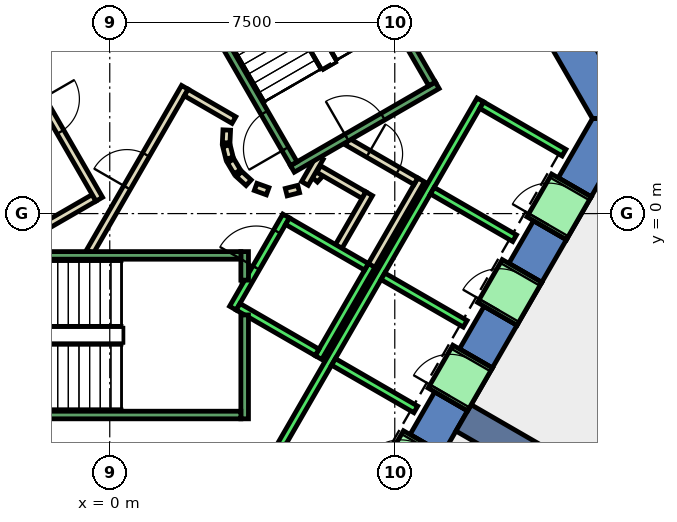
"""IFC4 building model, lengths in metres.
Left out: names, types, materials, properties, quantities, classifications, styles, units other than length and angle.
Written with IfcOpenShell. Run it as: python <this file> out.ifc"""

import sys

from ifc_helpers import new_model, si_unit, direction, frame, frame_2d, origin, place, context, subcontext, project, spatial, polyline, rectangle, outline, extrude, element, fill, save


model = new_model("IFC4")
c1 = context("Model", 3, precision=1e-05, world=origin(), true_north=direction((0.0, 1.0)))
c2 = subcontext(c1, "Body", "Model", "MODEL_VIEW")
j1 = project(units=[si_unit("LENGTHUNIT", "METRE"), si_unit("PLANEANGLEUNIT", "RADIAN")], contexts=[c1])
p1 = place(None, origin())
s1 = spatial("IfcSite", under=j1, at=p1, CompositionType="ELEMENT")
p2 = place(p1, origin())
s2 = spatial("IfcBuilding", under=s1, at=p2, CompositionType="ELEMENT")
p3 = place(p2, frame((0.0, 0.0, 20.0)))
s3 = spatial("IfcBuildingStorey", under=s2, at=p3, CompositionType="ELEMENT", Elevation=20.0)
p4 = place(p3, frame((0.0, 0.0, -0.45)))
e1 = element("IfcWall", 1, at=p4, inside=s3, PredefinedType="SHEAR", context=c2, shape_type="SweptSolid", body=[
    extrude(outline(polyline([(8.517, 11.748), (7.651, 11.248), (12.702, 2.5), (13.856, 2.5), (8.517, 11.748)])), origin(), (0.0, 0.0, 1.0), 5.0),
])
p5 = place(p3, frame((0.0, 0.0, -0.45)))
e2 = element("IfcWall", 2, at=p5, inside=s3, PredefinedType="SHEAR", context=c2, shape_type="SweptSolid", body=[
    extrude(outline(polyline([(9.417, -5.189), (8.551, -4.689), (7.902, -5.814), (8.767, -6.314), (9.417, -5.189)])), origin(), (0.0, 0.0, 1.0), 5.0),
])
p6 = place(p3, frame((0.0, 0.0, -0.45)))
e3 = element("IfcWall", 3, at=p6, inside=s3, PredefinedType="SHEAR", context=c2, shape_type="SweptSolid", body=[
    extrude(outline(polyline([(10.717, -2.937), (9.851, -2.437), (9.201, -3.563), (10.067, -4.063), (10.717, -2.937)])), origin(), (0.0, 0.0, 1.0), 5.0),
])
p7 = place(p3, frame((0.0, 0.0, -0.45)))
e4 = element("IfcWall", 4, at=p7, inside=s3, PredefinedType="SHEAR", context=c2, shape_type="SweptSolid", body=[
    extrude(outline(polyline([(12.017, -0.686), (11.151, -0.186), (10.501, -1.311), (11.367, -1.811), (12.017, -0.686)])), origin(), (0.0, 0.0, 1.0), 5.0),
])
p8 = place(p3, frame((0.0, 0.0, -0.45)))
e5 = element("IfcWall", 5, at=p8, inside=s3, PredefinedType="SHEAR", context=c2, shape_type="SweptSolid", body=[
    extrude(outline(polyline([(11.801, 0.94), (12.667, 0.44), (13.856, 2.5), (12.702, 2.5), (11.801, 0.94)])), origin(), (0.0, 0.0, 1.0), 5.0),
])
p9 = place(p3, frame((0.0, 0.0, 3.6)))
e6 = element("IfcWall", 6, at=p9, inside=s3, PredefinedType="SHEAR", context=c2, shape_type="SweptSolid", body=[
    extrude(outline(polyline([(8.767, -6.314), (7.902, -5.814), (7.252, -6.94), (8.117, -7.44), (8.767, -6.314)])), origin(), (0.0, 0.0, 1.0), 0.95),
])
p10 = place(p3, frame((0.0, 0.0, 3.6)))
e7 = element("IfcWall", 7, at=p10, inside=s3, PredefinedType="SHEAR", context=c2, shape_type="SweptSolid", body=[
    extrude(outline(polyline([(10.067, -4.063), (9.201, -3.563), (8.551, -4.689), (9.417, -5.189), (10.067, -4.063)])), origin(), (0.0, 0.0, 1.0), 0.95),
])
p11 = place(p3, frame((0.0, 0.0, 3.6)))
e8 = element("IfcWall", 8, at=p11, inside=s3, PredefinedType="SHEAR", context=c2, shape_type="SweptSolid", body=[
    extrude(outline(polyline([(11.367, -1.811), (10.501, -1.311), (9.851, -2.437), (10.717, -2.937), (11.367, -1.811)])), origin(), (0.0, 0.0, 1.0), 0.95),
])
p12 = place(p3, frame((0.0, 0.0, 3.6)))
e9 = element("IfcWall", 9, at=p12, inside=s3, PredefinedType="SHEAR", context=c2, shape_type="SweptSolid", body=[
    extrude(outline(polyline([(12.667, 0.44), (11.801, 0.94), (11.151, -0.186), (12.017, -0.686), (12.667, 0.44)])), origin(), (0.0, 0.0, 1.0), 0.95),
])
p13 = place(p3, frame((9.31, -5.375, -0.45), z_axis=(0.0, 0.0, 1.0), x_axis=(0.866017533419, -0.500013631625, 0.0)))
e10 = element("IfcWall", 10, at=p13, inside=s3, PredefinedType="SHEAR", context=c2, shape_type="SweptSolid", body=[
    extrude(rectangle(XDim=9.0, YDim=0.8, at=frame_2d((4.5, 0.0))), origin(), (0.0, 0.0, 1.0), 5.0),
])
p14 = place(p3, frame((5.39, 0.898, 0.0), z_axis=(0.0, 0.0, 1.0), x_axis=(0.673828488714, 0.738887791073, 0.0)))
e11 = element("IfcWall", 11, at=p14, inside=s3, PredefinedType="PARTITIONING", context=c2, shape_type="SweptSolid", body=[
    extrude(rectangle(XDim=0.263, YDim=0.2, at=frame_2d((0.131, 0.0))), origin(), (0.0, 0.0, 1.0), 4.55),
])
p15 = place(p3, frame((5.499, 1.172, 0.0), z_axis=(0.0, 0.0, 1.0), x_axis=(0.866333505267, -0.499465972466, 0.0)))
e12 = element("IfcWall", 12, at=p15, inside=s3, PredefinedType="PARTITIONING", context=c2, shape_type="SweptSolid", body=[
    extrude(rectangle(XDim=1.374, YDim=0.2, at=frame_2d((0.687, 0.0))), origin(), (0.0, 0.0, 1.0), 4.55),
])
p16 = place(p3, frame((6.826, 0.522, 0.0), z_axis=(0.0, 0.0, 1.0), x_axis=(-0.500016722714, -0.866015748706, 0.0)))
e13 = element("IfcWall", 13, at=p16, inside=s3, PredefinedType="PARTITIONING", context=c2, shape_type="SweptSolid", body=[
    extrude(rectangle(XDim=1.7, YDim=0.2, at=frame_2d((0.85, 0.0))), origin(), (0.0, 0.0, 1.0), 4.55),
])
p17 = place(p3, frame((8.192, 0.888, 0.0), z_axis=(0.0, 0.0, 1.0), x_axis=(-0.499940625693, -0.866059680843, 0.0)))
e14 = element("IfcWall", 14, at=p17, inside=s3, PredefinedType="PARTITIONING", context=c2, shape_type="SweptSolid", body=[
    extrude(rectangle(XDim=2.68, YDim=0.2, at=frame_2d((1.34, 0.0))), origin(), (0.0, 0.0, 1.0), 4.55),
])
p18 = place(p3, frame((5.135, 0.793, 0.0), z_axis=(0.0, 0.0, 1.0), x_axis=(0.499526442893, 0.866298639529, 0.0)))
e15 = element("IfcWall", 15, at=p18, inside=s3, PredefinedType="PARTITIONING", context=c2, shape_type="SweptSolid", body=[
    extrude(rectangle(XDim=0.791, YDim=0.2, at=frame_2d((0.396, 0.0))), origin(), (0.0, 0.0, 1.0), 4.55),
])
p19 = place(p3, frame((6.25, 1.894, 0.0), z_axis=(0.0, 0.0, 1.0), x_axis=(0.866043184279, -0.499969202016, 0.0)))
e16 = element("IfcWall", 16, at=p19, inside=s3, PredefinedType="PARTITIONING", context=c2, shape_type="SweptSolid", body=[
    extrude(rectangle(XDim=2.084, YDim=0.2, at=frame_2d((1.042, 0.0))), origin(), (0.0, 0.0, 1.0), 4.55),
])
p20 = place(p19, frame((0.642, 0.0, 0.0)))
e17 = element("IfcOpeningElement", 17, at=p20, cuts=e16, PredefinedType="OPENING", context=c2, shape_type="SweptSolid", body=[
    extrude(rectangle(XDim=0.9, YDim=2.1, at=frame_2d((0.45, 1.05))), frame((0.0, 0.11, 0.0), z_axis=(0.0, -1.0, 0.0), x_axis=(1.0, 0.0, 0.0)), (0.0, 0.0, 1.0), 0.22),
])
p21 = place(p3, frame((3.079, 2.199, 0.0), z_axis=(0.0, 0.0, 1.0), x_axis=(-0.047771483479, -0.998858290933, 0.0)))
e18 = element("IfcWall", 18, at=p21, inside=s3, PredefinedType="PARTITIONING", context=c2, shape_type="SweptSolid", body=[
    extrude(rectangle(XDim=0.337, YDim=0.2, at=frame_2d((0.169, 0.0))), origin(), (0.0, 0.0, 1.0), 4.55),
])
p22 = place(p3, frame((3.07, 1.786, 0.0), z_axis=(0.0, 0.0, 1.0), x_axis=(0.242705583207, -0.970099994784, 0.0)))
e19 = element("IfcWall", 19, at=p22, inside=s3, PredefinedType="PARTITIONING", context=c2, shape_type="SweptSolid", body=[
    extrude(rectangle(XDim=0.338, YDim=0.2, at=frame_2d((0.169, 0.0))), origin(), (0.0, 0.0, 1.0), 4.55),
])
for number, where, z_axis, x_axis in (
    (20, (3.182, 1.388, 0.0), (0.0, 0.0, 1.0), (0.512, -0.859, 0.0)),
    (21, (3.404, 1.039, 0.0), (0.0, 0.0, 1.0), (0.74, -0.672, 0.0)),
):
    element("IfcWall", number, at=place(p3, frame(where, z_axis=z_axis, x_axis=x_axis)), inside=s3, PredefinedType="PARTITIONING", context=c2, shape_type="SweptSolid", body=[
        extrude(rectangle(XDim=0.338, YDim=0.2, at=frame_2d((0.169, 0.0))), origin(), (0.0, 0.0, 1.0), 4.55),
    ])
p23 = place(p3, frame((3.838, 0.702, 0.0), z_axis=(0.0, 0.0, 1.0), x_axis=(0.941035081519, -0.338308993895, 0.0)))
e22 = element("IfcWall", 22, at=p23, inside=s3, PredefinedType="PARTITIONING", context=c2, shape_type="SweptSolid", body=[
    extrude(rectangle(XDim=0.337, YDim=0.2, at=frame_2d((0.168, 0.0))), origin(), (0.0, 0.0, 1.0), 4.55),
])
p24 = place(p3, frame((4.644, 0.564, 0.0), z_axis=(0.0, 0.0, 1.0), x_axis=(0.969929076366, 0.243387729394, 0.0)))
e23 = element("IfcWall", 23, at=p24, inside=s3, PredefinedType="PARTITIONING", context=c2, shape_type="SweptSolid", body=[
    extrude(rectangle(XDim=0.337, YDim=0.2, at=frame_2d((0.168, 0.0))), origin(), (0.0, 0.0, 1.0), 4.55),
])
p25 = place(p3, frame((-0.52, -1.0, 0.0), z_axis=(0.0, 0.0, 1.0), x_axis=(0.50011622646, 0.865958290007, 0.0)))
e24 = element("IfcWall", 24, at=p25, inside=s3, PredefinedType="PARTITIONING", context=c2, shape_type="SweptSolid", body=[
    extrude(rectangle(XDim=4.991, YDim=0.2, at=frame_2d((2.496, 0.0))), origin(), (0.0, 0.0, 1.0), 4.55),
])
p26 = place(p25, frame((1.945, 0.0, 0.0)))
e25 = element("IfcOpeningElement", 25, at=p26, cuts=e24, PredefinedType="OPENING", context=c2, shape_type="SweptSolid", body=[
    extrude(rectangle(XDim=1.0, YDim=2.1, at=frame_2d((0.5, 1.05))), frame((0.0, 0.11, 0.0), z_axis=(0.0, -1.0, 0.0), x_axis=(1.0, 0.0, 0.0)), (0.0, 0.0, 1.0), 0.22),
])
p27 = place(p3, frame((2.012, 3.186, 0.0), z_axis=(0.0, 0.0, 1.0), x_axis=(0.865891012941, -0.500232699559, 0.0)))
e26 = element("IfcWall", 26, at=p27, inside=s3, PredefinedType="PARTITIONING", context=c2, shape_type="SweptSolid", body=[
    extrude(rectangle(XDim=1.449, YDim=0.2, at=frame_2d((0.725, 0.0))), origin(), (0.0, 0.0, 1.0), 4.55),
])
p28 = place(p3, frame((-0.412, 0.414, 0.0), z_axis=(0.0, 0.0, 1.0), x_axis=(-0.866017369001, -0.500013916395, 0.0)))
e27 = element("IfcWall", 27, at=p28, inside=s3, PredefinedType="PARTITIONING", context=c2, shape_type="SweptSolid", body=[
    extrude(rectangle(XDim=1.45, YDim=0.2, at=frame_2d((0.725, 0.0))), origin(), (0.0, 0.0, 1.0), 4.55),
])
p29 = place(p3, frame((-2.771, 4.7, 0.0), z_axis=(0.0, 0.0, 1.0), x_axis=(0.499969479948, -0.866043023828, 0.0)))
e28 = element("IfcWall", 28, at=p29, inside=s3, PredefinedType="PARTITIONING", context=c2, shape_type="SweptSolid", body=[
    extrude(rectangle(XDim=4.99, YDim=0.2, at=frame_2d((2.495, 0.0))), origin(), (0.0, 0.0, 1.0), 4.55),
])
p30 = place(p29, frame((1.945, 0.0, 0.0)))
e29 = element("IfcOpeningElement", 29, at=p30, cuts=e28, PredefinedType="OPENING", context=c2, shape_type="SweptSolid", body=[
    extrude(rectangle(XDim=1.0, YDim=2.1, at=frame_2d((0.5, 1.05))), frame((0.0, 0.11, 0.0), z_axis=(0.0, -1.0, 0.0), x_axis=(1.0, 0.0, 0.0)), (0.0, 0.0, 1.0), 0.22),
])
p31 = place(p3, frame((11.007, 21.435, 0.0), z_axis=(0.0, 0.0, 1.0), x_axis=(0.499977403953, -0.866038449225, 0.0)))
e30 = element("IfcWall", 30, at=p31, inside=s3, PredefinedType="PARTITIONING", context=c2, shape_type="SweptSolid", body=[
    extrude(rectangle(XDim=21.939, YDim=0.15, at=frame_2d((10.969, 0.0))), origin(), (0.0, 0.0, 1.0), 4.55),
])
p32 = place(p3, frame((3.24, -2.488, 0.0), z_axis=(0.0, 0.0, 1.0), x_axis=(0.49994636267, 0.866056369097, 0.0)))
e31 = element("IfcWall", 31, at=p32, inside=s3, PredefinedType="STANDARD", context=c2, shape_type="SweptSolid", body=[
    extrude(rectangle(XDim=2.8, YDim=0.2, at=frame_2d((1.4, 0.0))), origin(), (0.0, 0.0, 1.0), 4.55),
])
p33 = place(p32, frame((1.225, 0.0, 0.0)))
e32 = element("IfcOpeningElement", 32, at=p33, cuts=e31, PredefinedType="OPENING", context=c2, shape_type="SweptSolid", body=[
    extrude(rectangle(XDim=1.1, YDim=2.1, at=frame_2d((0.55, 1.05))), frame((0.0, 0.11, 0.0), z_axis=(0.0, -1.0, 0.0), x_axis=(1.0, 0.0, 0.0)), (0.0, 0.0, 1.0), 0.22),
])
p34 = place(p3, frame((5.492, -3.788, 0.0), z_axis=(0.0, 0.0, 1.0), x_axis=(0.500011755427, 0.866018616679, 0.0)))
e33 = element("IfcWall", 33, at=p34, inside=s3, PredefinedType="STANDARD", context=c2, shape_type="SweptSolid", body=[
    extrude(rectangle(XDim=2.8, YDim=0.2, at=frame_2d((1.4, 0.0))), origin(), (0.0, 0.0, 1.0), 4.55),
])
p35 = place(p3, frame((3.377, -2.452, 0.0), z_axis=(0.0, 0.0, 1.0), x_axis=(0.865955154139, -0.50012165622, 0.0)))
e34 = element("IfcWall", 34, at=p35, inside=s3, PredefinedType="STANDARD", context=c2, shape_type="SweptSolid", body=[
    extrude(rectangle(XDim=2.4, YDim=0.2, at=frame_2d((1.2, 0.0))), origin(), (0.0, 0.0, 1.0), 4.55),
])
p36 = place(p3, frame((4.677, -0.2, 0.0), z_axis=(0.0, 0.0, 1.0), x_axis=(0.865973769406, -0.500089422704, 0.0)))
e35 = element("IfcWall", 35, at=p36, inside=s3, PredefinedType="STANDARD", context=c2, shape_type="SweptSolid", body=[
    extrude(rectangle(XDim=2.399, YDim=0.2, at=frame_2d((1.2, 0.0))), origin(), (0.0, 0.0, 1.0), 4.55),
])
p37 = place(p3, frame((4.451, -6.19, 0.0), z_axis=(0.0, 0.0, 1.0), x_axis=(0.50000090737, 0.866024879913, 0.0)))
e36 = element("IfcWall", 36, at=p37, inside=s3, PredefinedType="STANDARD", context=c2, shape_type="SweptSolid", body=[
    extrude(rectangle(XDim=10.6, YDim=0.2, at=frame_2d((5.3, 0.0))), origin(), (0.0, 0.0, 1.0), 4.55),
])
for number, where, z_axis, x_axis in (
    (37, (5.888, -3.902, 0.0), (0.0, 0.0, 1.0), (0.866, -0.5, 0.0)),
    (38, (7.188, -1.65, 0.0), (0.0, 0.0, 1.0), (0.866, -0.5, 0.0)),
    (39, (8.488, 0.602, 0.0), (0.0, 0.0, 1.0), (0.866, -0.5, 0.0)),
):
    element("IfcWall", number, at=place(p3, frame(where, z_axis=z_axis, x_axis=x_axis)), inside=s3, PredefinedType="STANDARD", context=c2, shape_type="SweptSolid", body=[
        extrude(rectangle(XDim=2.5, YDim=0.2, at=frame_2d((1.25, 0.0))), origin(), (0.0, 0.0, 1.0), 4.55),
    ])
p38 = place(p3, frame((9.788, 2.853, 0.0), z_axis=(0.0, 0.0, 1.0), x_axis=(0.865998541277, -0.500046524342, 0.0)))
e40 = element("IfcWall", 40, at=p38, inside=s3, PredefinedType="STANDARD", context=c2, shape_type="SweptSolid", body=[
    extrude(rectangle(XDim=2.5, YDim=0.2, at=frame_2d((1.25, 0.0))), origin(), (0.0, 0.0, 1.0), 4.55),
])
p39 = place(p3, frame((7.598, -7.14, 0.0), z_axis=(0.0, 0.0, 1.0), x_axis=(0.500362116554, 0.865816234728, 0.0)))
e41 = element("IfcWall", 41, at=p39, inside=s3, PredefinedType="STANDARD", context=c2, shape_type="SweptSolid", body=[
    extrude(rectangle(XDim=1.299, YDim=1.2, at=frame_2d((0.65, 0.0))), origin(), (0.0, 0.0, 1.0), 2.4),
])
p40 = place(p39, frame((0.1, 0.0, 0.0)))
e42 = element("IfcOpeningElement", 42, at=p40, cuts=e41, PredefinedType="OPENING", context=c2, shape_type="SweptSolid", body=[
    extrude(rectangle(XDim=1.1, YDim=2.3, at=frame_2d((0.55, 1.15))), frame((0.0, 0.61, 0.0), z_axis=(0.0, -1.0, 0.0), x_axis=(1.0, 0.0, 0.0)), (0.0, 0.0, 1.0), 1.22),
])
p41 = place(p3, frame((8.898, -4.889, 0.0), z_axis=(0.0, 0.0, 1.0), x_axis=(0.500036693733, 0.866004217611, 0.0)))
e43 = element("IfcWall", 43, at=p41, inside=s3, PredefinedType="STANDARD", context=c2, shape_type="SweptSolid", body=[
    extrude(rectangle(XDim=1.3, YDim=1.2, at=frame_2d((0.65, 0.0))), origin(), (0.0, 0.0, 1.0), 2.4),
])
p42 = place(p41, frame((0.1, 0.0, 0.0)))
e44 = element("IfcOpeningElement", 44, at=p42, cuts=e43, PredefinedType="OPENING", context=c2, shape_type="SweptSolid", body=[
    extrude(rectangle(XDim=1.1, YDim=2.3, at=frame_2d((0.55, 1.15))), frame((0.0, 0.61, 0.0), z_axis=(0.0, -1.0, 0.0), x_axis=(1.0, 0.0, 0.0)), (0.0, 0.0, 1.0), 1.22),
])
p43 = place(p3, frame((10.198, -2.637, 0.0), z_axis=(0.0, 0.0, 1.0), x_axis=(0.49989585183, 0.866085525409, 0.0)))
e45 = element("IfcWall", 45, at=p43, inside=s3, PredefinedType="STANDARD", context=c2, shape_type="SweptSolid", body=[
    extrude(rectangle(XDim=1.3, YDim=1.2, at=frame_2d((0.65, 0.0))), origin(), (0.0, 0.0, 1.0), 2.4),
])
p44 = place(p43, frame((0.1, 0.0, 0.0)))
e46 = element("IfcOpeningElement", 46, at=p44, cuts=e45, PredefinedType="OPENING", context=c2, shape_type="SweptSolid", body=[
    extrude(rectangle(XDim=1.1, YDim=2.3, at=frame_2d((0.55, 1.15))), frame((0.0, 0.61, 0.0), z_axis=(0.0, -1.0, 0.0), x_axis=(1.0, 0.0, 0.0)), (0.0, 0.0, 1.0), 1.22),
])
p45 = place(p3, frame((11.498, -0.385, 0.0), z_axis=(0.0, 0.0, 1.0), x_axis=(0.500221244143, 0.865897630733, 0.0)))
e47 = element("IfcWall", 47, at=p45, inside=s3, PredefinedType="STANDARD", context=c2, shape_type="SweptSolid", body=[
    extrude(rectangle(XDim=1.299, YDim=1.2, at=frame_2d((0.65, 0.0))), origin(), (0.0, 0.0, 1.0), 2.4),
])
p46 = place(p45, frame((0.1, 0.0, 0.0)))
e48 = element("IfcOpeningElement", 48, at=p46, cuts=e47, PredefinedType="OPENING", context=c2, shape_type="SweptSolid", body=[
    extrude(rectangle(XDim=1.1, YDim=2.3, at=frame_2d((0.55, 1.15))), frame((0.0, 0.61, 0.0), z_axis=(0.0, -1.0, 0.0), x_axis=(1.0, 0.0, 0.0)), (0.0, 0.0, 1.0), 1.22),
])
p47 = place(p3, frame((3.55, -2.667, 0.0), z_axis=(0.0, 0.0, 1.0), x_axis=(0.0, -1.0, 0.0)))
e49 = element("IfcWall", 49, at=p47, inside=s3, PredefinedType="STANDARD", context=c2, shape_type="SweptSolid", body=[
    extrude(rectangle(XDim=2.733, YDim=0.2, at=frame_2d((1.366, 0.0))), origin(), (0.0, 0.0, 1.0), 4.55),
])
p48 = place(p3, frame((3.55, -1.0, 0.0), z_axis=(0.0, 0.0, 1.0), x_axis=(0.0, -1.0, 0.0)))
e50 = element("IfcWall", 50, at=p48, inside=s3, PredefinedType="STANDARD", context=c2, shape_type="SweptSolid", body=[
    extrude(rectangle(XDim=0.751, YDim=0.2, at=frame_2d((0.375, 0.0))), origin(), (0.0, 0.0, 1.0), 4.55),
])
p49 = place(p3, frame((-3.45, -1.1, 0.0), z_axis=(0.0, 0.0, 1.0), x_axis=(1.0, 0.0, 0.0)))
e51 = element("IfcWall", 51, at=p49, inside=s3, PredefinedType="STANDARD", context=c2, shape_type="SweptSolid", body=[
    extrude(rectangle(XDim=6.9, YDim=0.2, at=frame_2d((3.45, 0.0))), origin(), (0.0, 0.0, 1.0), 4.55),
])
p50 = place(p49, frame((0.45, 0.0, 0.0)))
e52 = element("IfcOpeningElement", 52, at=p50, cuts=e51, PredefinedType="OPENING", context=c2, shape_type="SweptSolid", body=[
    extrude(rectangle(XDim=1.1, YDim=2.2, at=frame_2d((0.55, 1.1))), frame((0.0, 0.11, 0.0), z_axis=(0.0, -1.0, 0.0), x_axis=(1.0, 0.0, 0.0)), (0.0, 0.0, 1.0), 0.22),
])
p51 = place(p3, frame((-3.45, -5.3, 0.0), z_axis=(0.0, 0.0, 1.0), x_axis=(1.0, 0.0, 0.0)))
e53 = element("IfcWall", 53, at=p51, inside=s3, PredefinedType="STANDARD", context=c2, shape_type="SweptSolid", body=[
    extrude(rectangle(XDim=6.9, YDim=0.2, at=frame_2d((3.45, 0.0))), origin(), (0.0, 0.0, 1.0), 4.55),
])
p52 = place(p3, frame((4.806, 1.176, 0.0), z_axis=(0.0, 0.0, 1.0), x_axis=(0.866059941101, 0.499940174841, 0.0)))
e54 = element("IfcWall", 54, at=p52, inside=s3, PredefinedType="STANDARD", context=c2, shape_type="SweptSolid", body=[
    extrude(rectangle(XDim=4.4, YDim=0.2, at=frame_2d((2.2, 0.0))), origin(), (0.0, 0.0, 1.0), 4.55),
])
p53 = place(p52, frame((1.65, 0.0, 0.0)))
e55 = element("IfcOpeningElement", 55, at=p53, cuts=e54, PredefinedType="OPENING", context=c2, shape_type="SweptSolid", body=[
    extrude(rectangle(XDim=1.1, YDim=2.2, at=frame_2d((0.55, 1.1))), frame((0.0, 0.11, 0.0), z_axis=(0.0, -1.0, 0.0), x_axis=(1.0, 0.0, 0.0)), (0.0, 0.0, 1.0), 0.22),
])
p54 = place(p3, frame((4.843, 1.312, 0.0), z_axis=(0.0, 0.0, 1.0), x_axis=(-0.499963383562, 0.866046543262, 0.0)))
e56 = element("IfcWall", 56, at=p54, inside=s3, PredefinedType="STANDARD", context=c2, shape_type="SweptSolid", body=[
    extrude(rectangle(XDim=6.9, YDim=0.2, at=frame_2d((3.45, 0.0))), origin(), (0.0, 0.0, 1.0), 4.55),
])
p55 = place(p54, frame((0.45, 0.0, 0.0)))
e57 = element("IfcOpeningElement", 57, at=p55, cuts=e56, PredefinedType="OPENING", context=c2, shape_type="SweptSolid", body=[
    extrude(rectangle(XDim=1.1, YDim=2.2, at=frame_2d((0.55, 1.1))), frame((0.0, 0.11, 0.0), z_axis=(0.0, -1.0, 0.0), x_axis=(1.0, 0.0, 0.0)), (0.0, 0.0, 1.0), 0.22),
])
p56 = place(p3, frame((8.48, 3.412, 0.0), z_axis=(0.0, 0.0, 1.0), x_axis=(-0.499978703459, 0.866037698999, 0.0)))
e58 = element("IfcWall", 58, at=p56, inside=s3, PredefinedType="STANDARD", context=c2, shape_type="SweptSolid", body=[
    extrude(rectangle(XDim=6.9, YDim=0.2, at=frame_2d((3.45, 0.0))), origin(), (0.0, 0.0, 1.0), 4.55),
])
p57 = place(p3, frame((-1.393, 7.288, 0.0), z_axis=(0.0, 0.0, 1.0), x_axis=(-0.499963383562, -0.866046543262, 0.0)))
e59 = element("IfcWall", 59, at=p57, inside=s3, PredefinedType="STANDARD", context=c2, shape_type="SweptSolid", body=[
    extrude(rectangle(XDim=6.9, YDim=0.2, at=frame_2d((3.45, 0.0))), origin(), (0.0, 0.0, 1.0), 4.55),
])
p58 = place(p57, frame((0.45, 0.0, 0.0)))
e60 = element("IfcOpeningElement", 60, at=p58, cuts=e59, PredefinedType="OPENING", context=c2, shape_type="SweptSolid", body=[
    extrude(rectangle(XDim=1.1, YDim=2.2, at=frame_2d((0.55, 1.1))), frame((0.0, 0.11, 0.0), z_axis=(0.0, -1.0, 0.0), x_axis=(1.0, 0.0, 0.0)), (0.0, 0.0, 1.0), 0.22),
])
p59 = place(p26, origin())
e61 = element("IfcDoor", 61, at=p59, inside=s3, OperationType="SINGLE_SWING_LEFT", PredefinedType="DOOR", context=c2, shape_type="SweptSolid", body=[
    extrude(rectangle(XDim=1.0, YDim=2.1, at=frame_2d((0.5, 1.05))), frame((0.0, 0.025, 0.0), z_axis=(0.0, -1.0, 0.0), x_axis=(1.0, 0.0, 0.0)), (0.0, 0.0, 1.0), 0.05),
])
fill(e25, e61)
p60 = place(p30, origin())
e62 = element("IfcDoor", 62, at=p60, inside=s3, OperationType="SINGLE_SWING_RIGHT", PredefinedType="DOOR", context=c2, shape_type="SweptSolid", body=[
    extrude(rectangle(XDim=1.0, YDim=2.1, at=frame_2d((0.5, 1.05))), frame((0.0, 0.025, 0.0), z_axis=(0.0, -1.0, 0.0), x_axis=(1.0, 0.0, 0.0)), (0.0, 0.0, 1.0), 0.05),
])
fill(e29, e62)
p61 = place(p20, origin())
e63 = element("IfcDoor", 63, at=p61, inside=s3, OperationType="SINGLE_SWING_LEFT", PredefinedType="DOOR", context=c2, shape_type="SweptSolid", body=[
    extrude(rectangle(XDim=0.9, YDim=2.1, at=frame_2d((0.45, 1.05))), frame((0.0, 0.025, 0.0), z_axis=(0.0, -1.0, 0.0), x_axis=(1.0, 0.0, 0.0)), (0.0, 0.0, 1.0), 0.05),
])
fill(e17, e63)
p62 = place(p42, origin())
e64 = element("IfcDoor", 64, at=p62, inside=s3, OperationType="SLIDING_TO_LEFT", PredefinedType="DOOR", context=c2, shape_type="SweptSolid", body=[
    extrude(rectangle(XDim=1.1, YDim=2.3, at=frame_2d((0.55, 1.15))), frame((0.0, 0.025, 0.0), z_axis=(0.0, -1.0, 0.0), x_axis=(1.0, 0.0, 0.0)), (0.0, 0.0, 1.0), 0.05),
])
fill(e44, e64)
p63 = place(p44, origin())
e65 = element("IfcDoor", 65, at=p63, inside=s3, OperationType="SLIDING_TO_LEFT", PredefinedType="DOOR", context=c2, shape_type="SweptSolid", body=[
    extrude(rectangle(XDim=1.1, YDim=2.3, at=frame_2d((0.55, 1.15))), frame((0.0, 0.025, 0.0), z_axis=(0.0, -1.0, 0.0), x_axis=(1.0, 0.0, 0.0)), (0.0, 0.0, 1.0), 0.05),
])
fill(e46, e65)
p64 = place(p46, origin())
e66 = element("IfcDoor", 66, at=p64, inside=s3, OperationType="SLIDING_TO_LEFT", PredefinedType="DOOR", context=c2, shape_type="SweptSolid", body=[
    extrude(rectangle(XDim=1.1, YDim=2.3, at=frame_2d((0.55, 1.15))), frame((0.0, 0.025, 0.0), z_axis=(0.0, -1.0, 0.0), x_axis=(1.0, 0.0, 0.0)), (0.0, 0.0, 1.0), 0.05),
])
fill(e48, e66)
p65 = place(p33, origin())
e67 = element("IfcDoor", 67, at=p65, inside=s3, OperationType="SLIDING_TO_LEFT", PredefinedType="DOOR", context=c2, shape_type="SweptSolid", body=[
    extrude(rectangle(XDim=1.1, YDim=2.1, at=frame_2d((0.55, 1.05))), frame((0.0, 0.025, 0.0), z_axis=(0.0, -1.0, 0.0), x_axis=(1.0, 0.0, 0.0)), (0.0, 0.0, 1.0), 0.05),
])
fill(e32, e67)
p66 = place(p55, origin())
e68 = element("IfcDoor", 68, at=p66, inside=s3, OperationType="SINGLE_SWING_LEFT", PredefinedType="DOOR", context=c2, shape_type="SweptSolid", body=[
    extrude(rectangle(XDim=1.1, YDim=2.2, at=frame_2d((0.55, 1.1))), frame((0.0, 0.025, 0.0), z_axis=(0.0, -1.0, 0.0), x_axis=(1.0, 0.0, 0.0)), (0.0, 0.0, 1.0), 0.05),
])
fill(e57, e68)
p67 = place(p53, origin())
e69 = element("IfcDoor", 69, at=p67, inside=s3, OperationType="SINGLE_SWING_LEFT", PredefinedType="DOOR", context=c2, shape_type="SweptSolid", body=[
    extrude(rectangle(XDim=1.1, YDim=2.2, at=frame_2d((0.55, 1.1))), frame((0.0, 0.025, 0.0), z_axis=(0.0, -1.0, 0.0), x_axis=(1.0, 0.0, 0.0)), (0.0, 0.0, 1.0), 0.05),
])
fill(e55, e69)
save(model, sys.argv[1])
